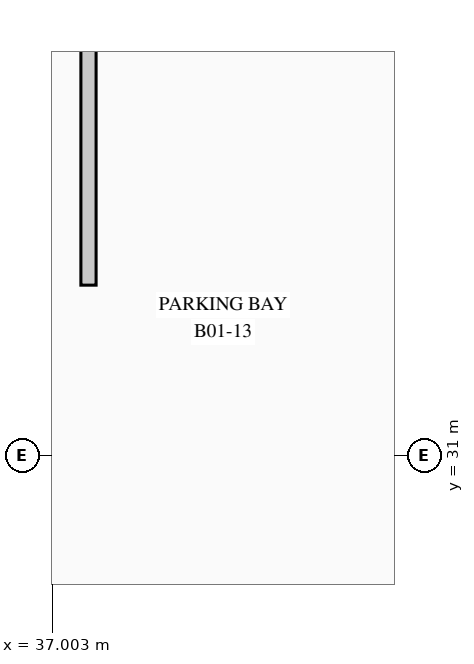
"""IFC4 building model, lengths in metres.
Left out: names, types, materials, properties, quantities, classifications, styles, units other than length and angle.
Written with IfcOpenShell. Run it as: python <this file> out.ifc"""

import sys

from ifc_helpers import new_model, si_unit, direction, frame, frame_2d, origin, place, context, subcontext, project, spatial, rectangle, extrude, element, save


model = new_model("IFC4")
c1 = context("Model", 3, precision=1e-05, world=origin(), true_north=direction((0.0, 1.0)))
c2 = subcontext(c1, "Body", "Model", "MODEL_VIEW")
j1 = project(units=[si_unit("LENGTHUNIT", "METRE"), si_unit("PLANEANGLEUNIT", "RADIAN")], contexts=[c1])
p1 = place(None, origin())
s1 = spatial("IfcSite", under=j1, at=p1, CompositionType="ELEMENT")
p2 = place(p1, origin())
s2 = spatial("IfcBuilding", under=s1, at=p2, CompositionType="ELEMENT")
p3 = place(p2, frame((0.0, 0.0, -4.5)))
s3 = spatial("IfcBuildingStorey", under=s2, at=p3, CompositionType="ELEMENT", Elevation=-4.5)
p4 = place(p3, frame((37.48, 33.24, 0.0), z_axis=(0.0, 0.0, 1.0), x_axis=(0.0, 1.0, 0.0)))
e1 = element("IfcWall", 1, at=p4, inside=s3, PredefinedType="PARTITIONING", context=c2, shape_type="SweptSolid", body=[
    extrude(rectangle(XDim=7.42, YDim=0.2, at=frame_2d((3.71, 0.0))), origin(), (0.0, 0.0, 1.0), 4.165),
])
save(model, sys.argv[1])
